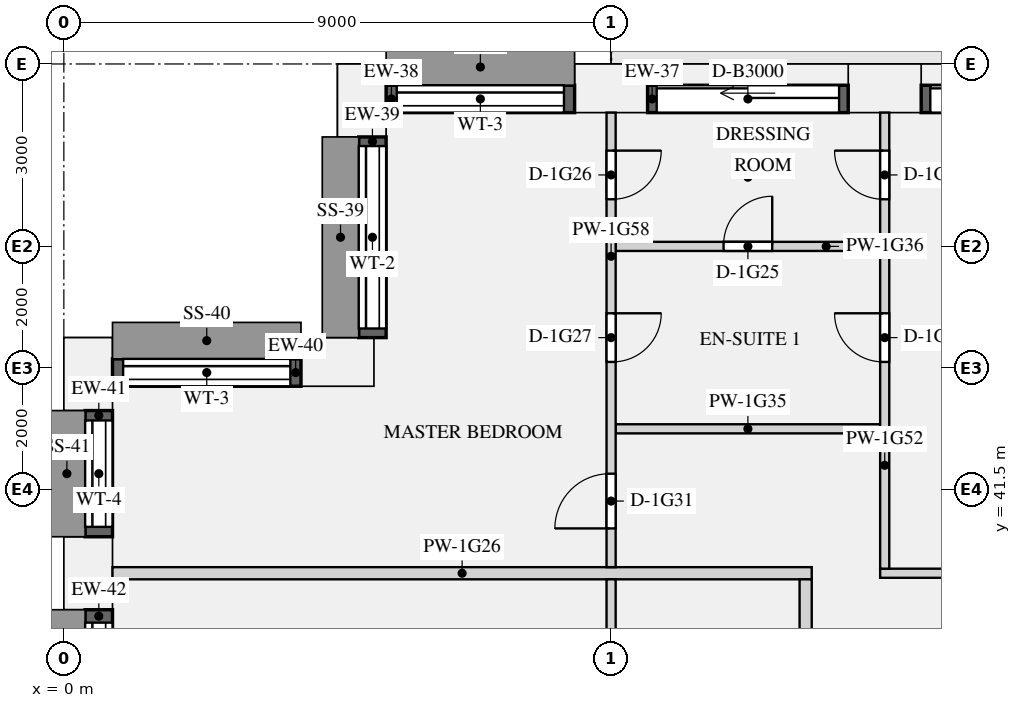
"""IFC4 building model, lengths in metres.
Left out: names, types, materials, properties, quantities, classifications, styles, units other than length and angle.
Written with IfcOpenShell. Run it as: python <this file> out.ifc"""

import sys

from ifc_helpers import new_model, si_unit, direction, frame, frame_2d, origin, origin_2d, place, context, subcontext, project, spatial, rectangle, extrude, element, fill, save


model = new_model("IFC4")
c1 = context("Model", 3, precision=1e-05, world=origin(), true_north=direction((0.0, 1.0)))
c2 = subcontext(c1, "Body", "Model", "MODEL_VIEW")
j1 = project(units=[si_unit("LENGTHUNIT", "METRE"), si_unit("PLANEANGLEUNIT", "RADIAN")], contexts=[c1])
p1 = place(None, origin())
s1 = spatial("IfcSite", under=j1, at=p1, CompositionType="ELEMENT")
p2 = place(p1, origin())
s2 = spatial("IfcBuilding", under=s1, at=p2, CompositionType="ELEMENT")
p3 = place(p2, frame((0.0, 0.0, 66.75)))
s3 = spatial("IfcBuildingStorey", under=s2, at=p3, CompositionType="ELEMENT", Elevation=66.75)
for number, where, z_axis, x_axis in (
    (1, (13.5, 48.1, 0.0), (0.0, 0.0, 1.0), (-1.0, 0.0, 0.0)),
    (2, (9.0, 48.1, 0.0), (0.0, 0.0, 1.0), (-1.0, 0.0, 0.0)),
    (3, (4.9, 47.9, 0.0), (0.0, 0.0, 1.0), (0.0, -1.0, 0.0)),
    (4, (4.5, 43.6, 0.0), (0.0, 0.0, 1.0), (-1.0, 0.0, 0.0)),
    (5, (0.4, 43.4, 0.0), (0.0, 0.0, 1.0), (0.0, -1.0, 0.0)),
    (6, (0.4, 40.125, 0.0), (0.0, 0.0, 1.0), (0.0, -1.0, 0.0)),
):
    element("IfcColumn", number, at=place(p3, frame(where, z_axis=z_axis, x_axis=x_axis)), inside=s3, PredefinedType="USERDEFINED", context=c2, shape_type="SweptSolid", body=[
        extrude(rectangle(XDim=1.2, YDim=0.8, at=origin_2d()), origin(), (0.0, 0.0, 1.0), 3.15),
    ])
p4 = place(p3, frame((17.4, 47.925, 0.0), z_axis=(0.0, 0.0, 1.0), x_axis=(-1.0, 0.0, 0.0)))
e7 = element("IfcWall", 7, at=p4, inside=s3, PredefinedType="SOLIDWALL", context=c2, shape_type="SweptSolid", body=[
    extrude(rectangle(XDim=3.3, YDim=0.45, at=frame_2d((1.65, 0.0))), origin(), (0.0, 0.0, 1.0), 2.83),
])
p5 = place(p4, frame((0.15, 0.0, 0.0)))
e8 = element("IfcOpeningElement", 8, at=p5, cuts=e7, PredefinedType="OPENING", context=c2, shape_type="SweptSolid", body=[
    extrude(rectangle(XDim=3.0, YDim=2.3, at=frame_2d((1.5, 1.15))), frame((0.0, 0.235, 0.0), z_axis=(0.0, -1.0, 0.0), x_axis=(1.0, 0.0, 0.0)), (0.0, 0.0, 1.0), 0.47),
])
p6 = place(p3, frame((12.9, 47.925, 0.0), z_axis=(0.0, 0.0, 1.0), x_axis=(-1.0, 0.0, 0.0)))
e9 = element("IfcWall", 9, at=p6, inside=s3, PredefinedType="SOLIDWALL", context=c2, shape_type="SweptSolid", body=[
    extrude(rectangle(XDim=3.3, YDim=0.45, at=frame_2d((1.65, 0.0))), origin(), (0.0, 0.0, 1.0), 2.83),
])
p7 = place(p6, frame((0.15, 0.0, 0.0)))
e10 = element("IfcOpeningElement", 10, at=p7, cuts=e9, PredefinedType="OPENING", context=c2, shape_type="SweptSolid", body=[
    extrude(rectangle(XDim=3.0, YDim=2.3, at=frame_2d((1.5, 1.15))), frame((0.0, 0.235, 0.0), z_axis=(0.0, -1.0, 0.0), x_axis=(1.0, 0.0, 0.0)), (0.0, 0.0, 1.0), 0.47),
])
p8 = place(p3, frame((8.4, 47.925, 0.9), z_axis=(0.0, 0.0, 1.0), x_axis=(-1.0, 0.0, 0.0)))
e11 = element("IfcWall", 11, at=p8, inside=s3, PredefinedType="SOLIDWALL", context=c2, shape_type="SweptSolid", body=[
    extrude(rectangle(XDim=3.1, YDim=0.45, at=frame_2d((1.55, 0.0))), origin(), (0.0, 0.0, 1.0), 1.93),
])
p9 = place(p8, frame((0.175, 0.0, 0.15)))
e12 = element("IfcOpeningElement", 12, at=p9, cuts=e11, PredefinedType="OPENING", context=c2, shape_type="SweptSolid", body=[
    extrude(rectangle(XDim=2.75, YDim=1.5, at=frame_2d((1.375, 0.75))), frame((0.0, 0.235, 0.0), z_axis=(0.0, -1.0, 0.0), x_axis=(1.0, 0.0, 0.0)), (0.0, 0.0, 1.0), 0.47),
])
p10 = place(p3, frame((5.075, 47.3, 0.9), z_axis=(0.0, 0.0, 1.0), x_axis=(0.0, -1.0, 0.0)))
e13 = element("IfcWall", 13, at=p10, inside=s3, PredefinedType="SOLIDWALL", context=c2, shape_type="SweptSolid", body=[
    extrude(rectangle(XDim=3.3, YDim=0.45, at=frame_2d((1.65, 0.0))), origin(), (0.0, 0.0, 1.0), 1.93),
])
p11 = place(p10, frame((0.15, 0.0, 0.15)))
e14 = element("IfcOpeningElement", 14, at=p11, cuts=e13, PredefinedType="OPENING", context=c2, shape_type="SweptSolid", body=[
    extrude(rectangle(XDim=3.0, YDim=1.5, at=frame_2d((1.5, 0.75))), frame((0.0, 0.235, 0.0), z_axis=(0.0, -1.0, 0.0), x_axis=(1.0, 0.0, 0.0)), (0.0, 0.0, 1.0), 0.47),
])
p12 = place(p3, frame((3.9, 43.425, 0.9), z_axis=(0.0, 0.0, 1.0), x_axis=(-1.0, 0.0, 0.0)))
e15 = element("IfcWall", 15, at=p12, inside=s3, PredefinedType="SOLIDWALL", context=c2, shape_type="SweptSolid", body=[
    extrude(rectangle(XDim=3.1, YDim=0.45, at=frame_2d((1.55, 0.0))), origin(), (0.0, 0.0, 1.0), 1.93),
])
p13 = place(p12, frame((0.175, 0.0, 0.15)))
e16 = element("IfcOpeningElement", 16, at=p13, cuts=e15, PredefinedType="OPENING", context=c2, shape_type="SweptSolid", body=[
    extrude(rectangle(XDim=2.75, YDim=1.5, at=frame_2d((1.375, 0.75))), frame((0.0, 0.235, 0.0), z_axis=(0.0, -1.0, 0.0), x_axis=(1.0, 0.0, 0.0)), (0.0, 0.0, 1.0), 0.47),
])
p14 = place(p3, frame((0.575, 42.8, 0.9), z_axis=(0.0, 0.0, 1.0), x_axis=(0.0, -1.0, 0.0)))
e17 = element("IfcWall", 17, at=p14, inside=s3, PredefinedType="SOLIDWALL", context=c2, shape_type="SweptSolid", body=[
    extrude(rectangle(XDim=2.075, YDim=0.45, at=frame_2d((1.038, 0.0))), origin(), (0.0, 0.0, 1.0), 1.93),
])
p15 = place(p14, frame((0.163, 0.0, 0.15)))
e18 = element("IfcOpeningElement", 18, at=p15, cuts=e17, PredefinedType="OPENING", context=c2, shape_type="SweptSolid", body=[
    extrude(rectangle(XDim=1.75, YDim=1.5, at=frame_2d((0.875, 0.75))), frame((0.0, 0.235, 0.0), z_axis=(0.0, -1.0, 0.0), x_axis=(1.0, 0.0, 0.0)), (0.0, 0.0, 1.0), 0.47),
])
p16 = place(p3, frame((0.575, 39.525, 0.9), z_axis=(0.0, 0.0, 1.0), x_axis=(0.0, -1.0, 0.0)))
e19 = element("IfcWall", 19, at=p16, inside=s3, PredefinedType="SOLIDWALL", context=c2, shape_type="SweptSolid", body=[
    extrude(rectangle(XDim=2.675, YDim=0.45, at=frame_2d((1.337, 0.0))), origin(), (0.0, 0.0, 1.0), 1.93),
])
p17 = place(p16, frame((0.212, 0.0, 0.15)))
e20 = element("IfcOpeningElement", 20, at=p17, cuts=e19, PredefinedType="OPENING", context=c2, shape_type="SweptSolid", body=[
    extrude(rectangle(XDim=2.25, YDim=1.5, at=frame_2d((1.125, 0.75))), frame((0.0, 0.235, 0.0), z_axis=(0.0, -1.0, 0.0), x_axis=(1.0, 0.0, 0.0)), (0.0, 0.0, 1.0), 0.47),
])
p18 = place(p3, frame((13.425, 40.125, 0.0), z_axis=(0.0, 0.0, 1.0), x_axis=(1.0, 0.0, 0.0)))
e21 = element("IfcWall", 21, at=p18, inside=s3, PredefinedType="PARTITIONING", context=c2, shape_type="SweptSolid", body=[
    extrude(rectangle(XDim=4.65, YDim=0.15, at=frame_2d((2.325, 0.0))), origin(), (0.0, 0.0, 1.0), 2.83),
])
p19 = place(p3, frame((0.8, 40.125, 0.0), z_axis=(0.0, 0.0, 1.0), x_axis=(1.0, 0.0, 0.0)))
e22 = element("IfcWall", 22, at=p19, inside=s3, PredefinedType="PARTITIONING", context=c2, shape_type="SweptSolid", body=[
    extrude(rectangle(XDim=11.5, YDim=0.2, at=frame_2d((5.75, 0.0))), origin(), (0.0, 0.0, 1.0), 2.83),
])
p20 = place(p3, frame((9.075, 42.5, 0.0), z_axis=(0.0, 0.0, 1.0), x_axis=(1.0, 0.0, 0.0)))
e23 = element("IfcWall", 23, at=p20, inside=s3, PredefinedType="PARTITIONING", context=c2, shape_type="SweptSolid", body=[
    extrude(rectangle(XDim=4.35, YDim=0.15, at=frame_2d((2.175, 0.0))), origin(), (0.0, 0.0, 1.0), 2.83),
])
p21 = place(p3, frame((9.075, 45.5, 0.0), z_axis=(0.0, 0.0, 1.0), x_axis=(1.0, 0.0, 0.0)))
e24 = element("IfcWall", 24, at=p21, inside=s3, PredefinedType="PARTITIONING", context=c2, shape_type="SweptSolid", body=[
    extrude(rectangle(XDim=4.35, YDim=0.15, at=frame_2d((2.175, 0.0))), origin(), (0.0, 0.0, 1.0), 2.83),
])
p22 = place(p21, frame((1.775, 0.0, 0.0)))
e25 = element("IfcOpeningElement", 25, at=p22, cuts=e24, PredefinedType="OPENING", context=c2, shape_type="SweptSolid", body=[
    extrude(rectangle(XDim=0.8, YDim=2.1, at=frame_2d((0.4, 1.05))), frame((0.0, 0.085, 0.0), z_axis=(0.0, -1.0, 0.0), x_axis=(1.0, 0.0, 0.0)), (0.0, 0.0, 1.0), 0.17),
])
p23 = place(p3, frame((13.5, 40.2, 0.0), z_axis=(0.0, 0.0, 1.0), x_axis=(0.0, 1.0, 0.0)))
e26 = element("IfcWall", 26, at=p23, inside=s3, PredefinedType="PARTITIONING", context=c2, shape_type="SweptSolid", body=[
    extrude(rectangle(XDim=7.5, YDim=0.15, at=frame_2d((3.75, 0.0))), origin(), (0.0, 0.0, 1.0), 2.83),
])
p24 = place(p23, frame((6.075, 0.0, 0.0)))
e27 = element("IfcOpeningElement", 27, at=p24, cuts=e26, PredefinedType="OPENING", context=c2, shape_type="SweptSolid", body=[
    extrude(rectangle(XDim=0.8, YDim=2.1, at=frame_2d((0.4, 1.05))), frame((0.0, 0.085, 0.0), z_axis=(0.0, -1.0, 0.0), x_axis=(1.0, 0.0, 0.0)), (0.0, 0.0, 1.0), 0.17),
])
p25 = place(p23, frame((3.4, 0.0, 0.0)))
e28 = element("IfcOpeningElement", 28, at=p25, cuts=e26, PredefinedType="OPENING", context=c2, shape_type="SweptSolid", body=[
    extrude(rectangle(XDim=0.8, YDim=2.1, at=frame_2d((0.4, 1.05))), frame((0.0, 0.085, 0.0), z_axis=(0.0, -1.0, 0.0), x_axis=(1.0, 0.0, 0.0)), (0.0, 0.0, 1.0), 0.17),
])
p26 = place(p3, frame((9.0, 32.45, 0.0), z_axis=(0.0, 0.0, 1.0), x_axis=(0.0, 1.0, 0.0)))
e29 = element("IfcWall", 29, at=p26, inside=s3, PredefinedType="PARTITIONING", context=c2, shape_type="SweptSolid", body=[
    extrude(rectangle(XDim=7.575, YDim=0.15, at=frame_2d((3.788, 0.0))), origin(), (0.0, 0.0, 1.0), 2.83),
])
p27 = place(p26, frame((5.288, 0.0, 0.0)))
e30 = element("IfcOpeningElement", 30, at=p27, cuts=e29, PredefinedType="OPENING", context=c2, shape_type="SweptSolid", body=[
    extrude(rectangle(XDim=0.9, YDim=2.1, at=frame_2d((0.45, 1.05))), frame((0.0, 0.085, 0.0), z_axis=(0.0, -1.0, 0.0), x_axis=(1.0, 0.0, 0.0)), (0.0, 0.0, 1.0), 0.17),
])
p28 = place(p3, frame((9.0, 40.225, 0.0), z_axis=(0.0, 0.0, 1.0), x_axis=(0.0, 1.0, 0.0)))
e31 = element("IfcWall", 31, at=p28, inside=s3, PredefinedType="PARTITIONING", context=c2, shape_type="SweptSolid", body=[
    extrude(rectangle(XDim=7.475, YDim=0.15, at=frame_2d((3.737, 0.0))), origin(), (0.0, 0.0, 1.0), 2.83),
])
p29 = place(p28, frame((6.05, 0.0, 0.0)))
e32 = element("IfcOpeningElement", 32, at=p29, cuts=e31, PredefinedType="OPENING", context=c2, shape_type="SweptSolid", body=[
    extrude(rectangle(XDim=0.8, YDim=2.1, at=frame_2d((0.4, 1.05))), frame((0.0, 0.085, 0.0), z_axis=(0.0, -1.0, 0.0), x_axis=(1.0, 0.0, 0.0)), (0.0, 0.0, 1.0), 0.17),
])
p30 = place(p28, frame((3.375, 0.0, 0.0)))
e33 = element("IfcOpeningElement", 33, at=p30, cuts=e31, PredefinedType="OPENING", context=c2, shape_type="SweptSolid", body=[
    extrude(rectangle(XDim=0.8, YDim=2.1, at=frame_2d((0.4, 1.05))), frame((0.0, 0.085, 0.0), z_axis=(0.0, -1.0, 0.0), x_axis=(1.0, 0.0, 0.0)), (0.0, 0.0, 1.0), 0.17),
])
p31 = place(p28, frame((0.637, 0.0, 0.0)))
e34 = element("IfcOpeningElement", 34, at=p31, cuts=e31, PredefinedType="OPENING", context=c2, shape_type="SweptSolid", body=[
    extrude(rectangle(XDim=0.9, YDim=2.1, at=frame_2d((0.45, 1.05))), frame((0.0, 0.085, 0.0), z_axis=(0.0, -1.0, 0.0), x_axis=(1.0, 0.0, 0.0)), (0.0, 0.0, 1.0), 0.17),
])
p32 = place(p3, frame((12.2, 35.4, 0.0), z_axis=(0.0, 0.0, 1.0), x_axis=(0.0, 1.0, 0.0)))
e35 = element("IfcWall", 35, at=p32, inside=s3, PredefinedType="PARTITIONING", context=c2, shape_type="SweptSolid", body=[
    extrude(rectangle(XDim=4.625, YDim=0.2, at=frame_2d((2.312, 0.0))), origin(), (0.0, 0.0, 1.0), 2.83),
])
p33 = place(p5, origin())
e36 = element("IfcDoor", 36, at=p33, inside=s3, OperationType="SLIDING_TO_LEFT", PredefinedType="DOOR", context=c2, shape_type="SweptSolid", body=[
    extrude(rectangle(XDim=3.0, YDim=2.3, at=frame_2d((1.5, 1.15))), frame((0.0, -0.07, 0.0), z_axis=(0.0, -1.0, 0.0), x_axis=(1.0, 0.0, 0.0)), (0.0, 0.0, 1.0), 0.05),
])
fill(e8, e36)
p34 = place(p7, origin())
e37 = element("IfcDoor", 37, at=p34, inside=s3, OperationType="SLIDING_TO_LEFT", PredefinedType="DOOR", context=c2, shape_type="SweptSolid", body=[
    extrude(rectangle(XDim=3.0, YDim=2.3, at=frame_2d((1.5, 1.15))), frame((0.0, -0.07, 0.0), z_axis=(0.0, -1.0, 0.0), x_axis=(1.0, 0.0, 0.0)), (0.0, 0.0, 1.0), 0.05),
])
fill(e10, e37)
p35 = place(p9, origin())
e38 = element("IfcWindow", 38, at=p35, inside=s3, PartitioningType="SINGLE_PANEL", PredefinedType="WINDOW", context=c2, shape_type="SweptSolid", body=[
    extrude(rectangle(XDim=2.75, YDim=1.5, at=frame_2d((1.375, 0.75))), frame((0.0, -0.065, 0.0), z_axis=(0.0, -1.0, 0.0), x_axis=(1.0, 0.0, 0.0)), (0.0, 0.0, 1.0), 0.06),
])
fill(e12, e38)
p36 = place(p11, origin())
e39 = element("IfcWindow", 39, at=p36, inside=s3, PartitioningType="SINGLE_PANEL", PredefinedType="WINDOW", context=c2, shape_type="SweptSolid", body=[
    extrude(rectangle(XDim=3.0, YDim=1.5, at=frame_2d((1.5, 0.75))), frame((0.0, -0.065, 0.0), z_axis=(0.0, -1.0, 0.0), x_axis=(1.0, 0.0, 0.0)), (0.0, 0.0, 1.0), 0.06),
])
fill(e14, e39)
p37 = place(p13, origin())
e40 = element("IfcWindow", 40, at=p37, inside=s3, PartitioningType="SINGLE_PANEL", PredefinedType="WINDOW", context=c2, shape_type="SweptSolid", body=[
    extrude(rectangle(XDim=2.75, YDim=1.5, at=frame_2d((1.375, 0.75))), frame((0.0, -0.065, 0.0), z_axis=(0.0, -1.0, 0.0), x_axis=(1.0, 0.0, 0.0)), (0.0, 0.0, 1.0), 0.06),
])
fill(e16, e40)
p38 = place(p15, origin())
e41 = element("IfcWindow", 41, at=p38, inside=s3, PartitioningType="SINGLE_PANEL", PredefinedType="WINDOW", context=c2, shape_type="SweptSolid", body=[
    extrude(rectangle(XDim=1.75, YDim=1.5, at=frame_2d((0.875, 0.75))), frame((0.0, -0.065, 0.0), z_axis=(0.0, -1.0, 0.0), x_axis=(1.0, 0.0, 0.0)), (0.0, 0.0, 1.0), 0.06),
])
fill(e18, e41)
p39 = place(p17, origin())
e42 = element("IfcWindow", 42, at=p39, inside=s3, PartitioningType="SINGLE_PANEL", PredefinedType="WINDOW", context=c2, shape_type="SweptSolid", body=[
    extrude(rectangle(XDim=2.25, YDim=1.5, at=frame_2d((1.125, 0.75))), frame((0.0, -0.065, 0.0), z_axis=(0.0, -1.0, 0.0), x_axis=(1.0, 0.0, 0.0)), (0.0, 0.0, 1.0), 0.06),
])
fill(e20, e42)
p40 = place(p24, origin())
e43 = element("IfcDoor", 43, at=p40, inside=s3, OperationType="SINGLE_SWING_RIGHT", PredefinedType="DOOR", context=c2, shape_type="SweptSolid", body=[
    extrude(rectangle(XDim=0.8, YDim=2.1, at=frame_2d((0.4, 1.05))), frame((0.0, 0.025, 0.0), z_axis=(0.0, -1.0, 0.0), x_axis=(1.0, 0.0, 0.0)), (0.0, 0.0, 1.0), 0.05),
])
fill(e27, e43)
p41 = place(p25, origin())
e44 = element("IfcDoor", 44, at=p41, inside=s3, OperationType="SINGLE_SWING_RIGHT", PredefinedType="DOOR", context=c2, shape_type="SweptSolid", body=[
    extrude(rectangle(XDim=0.8, YDim=2.1, at=frame_2d((0.4, 1.05))), frame((0.0, 0.025, 0.0), z_axis=(0.0, -1.0, 0.0), x_axis=(1.0, 0.0, 0.0)), (0.0, 0.0, 1.0), 0.05),
])
fill(e28, e44)
p42 = place(p22, origin())
e45 = element("IfcDoor", 45, at=p42, inside=s3, OperationType="SINGLE_SWING_RIGHT", PredefinedType="DOOR", context=c2, shape_type="SweptSolid", body=[
    extrude(rectangle(XDim=0.8, YDim=2.1, at=frame_2d((0.4, 1.05))), frame((0.0, 0.025, 0.0), z_axis=(0.0, -1.0, 0.0), x_axis=(1.0, 0.0, 0.0)), (0.0, 0.0, 1.0), 0.05),
])
fill(e25, e45)
p43 = place(p29, frame((0.8, 0.0, 0.0), z_axis=(0.0, 0.0, 1.0), x_axis=(-1.0, 0.0, 0.0)))
e46 = element("IfcDoor", 46, at=p43, inside=s3, OperationType="SINGLE_SWING_LEFT", PredefinedType="DOOR", context=c2, shape_type="SweptSolid", body=[
    extrude(rectangle(XDim=0.8, YDim=2.1, at=frame_2d((0.4, 1.05))), frame((0.0, 0.025, 0.0), z_axis=(0.0, -1.0, 0.0), x_axis=(1.0, 0.0, 0.0)), (0.0, 0.0, 1.0), 0.05),
])
fill(e32, e46)
p44 = place(p30, frame((0.8, 0.0, 0.0), z_axis=(0.0, 0.0, 1.0), x_axis=(-1.0, 0.0, 0.0)))
e47 = element("IfcDoor", 47, at=p44, inside=s3, OperationType="SINGLE_SWING_LEFT", PredefinedType="DOOR", context=c2, shape_type="SweptSolid", body=[
    extrude(rectangle(XDim=0.8, YDim=2.1, at=frame_2d((0.4, 1.05))), frame((0.0, 0.025, 0.0), z_axis=(0.0, -1.0, 0.0), x_axis=(1.0, 0.0, 0.0)), (0.0, 0.0, 1.0), 0.05),
])
fill(e33, e47)
p45 = place(p31, origin())
e48 = element("IfcDoor", 48, at=p45, inside=s3, OperationType="SINGLE_SWING_LEFT", PredefinedType="DOOR", context=c2, shape_type="SweptSolid", body=[
    extrude(rectangle(XDim=0.9, YDim=2.1, at=frame_2d((0.45, 1.05))), frame((0.0, 0.025, 0.0), z_axis=(0.0, -1.0, 0.0), x_axis=(1.0, 0.0, 0.0)), (0.0, 0.0, 1.0), 0.05),
])
fill(e34, e48)
save(model, sys.argv[1])
